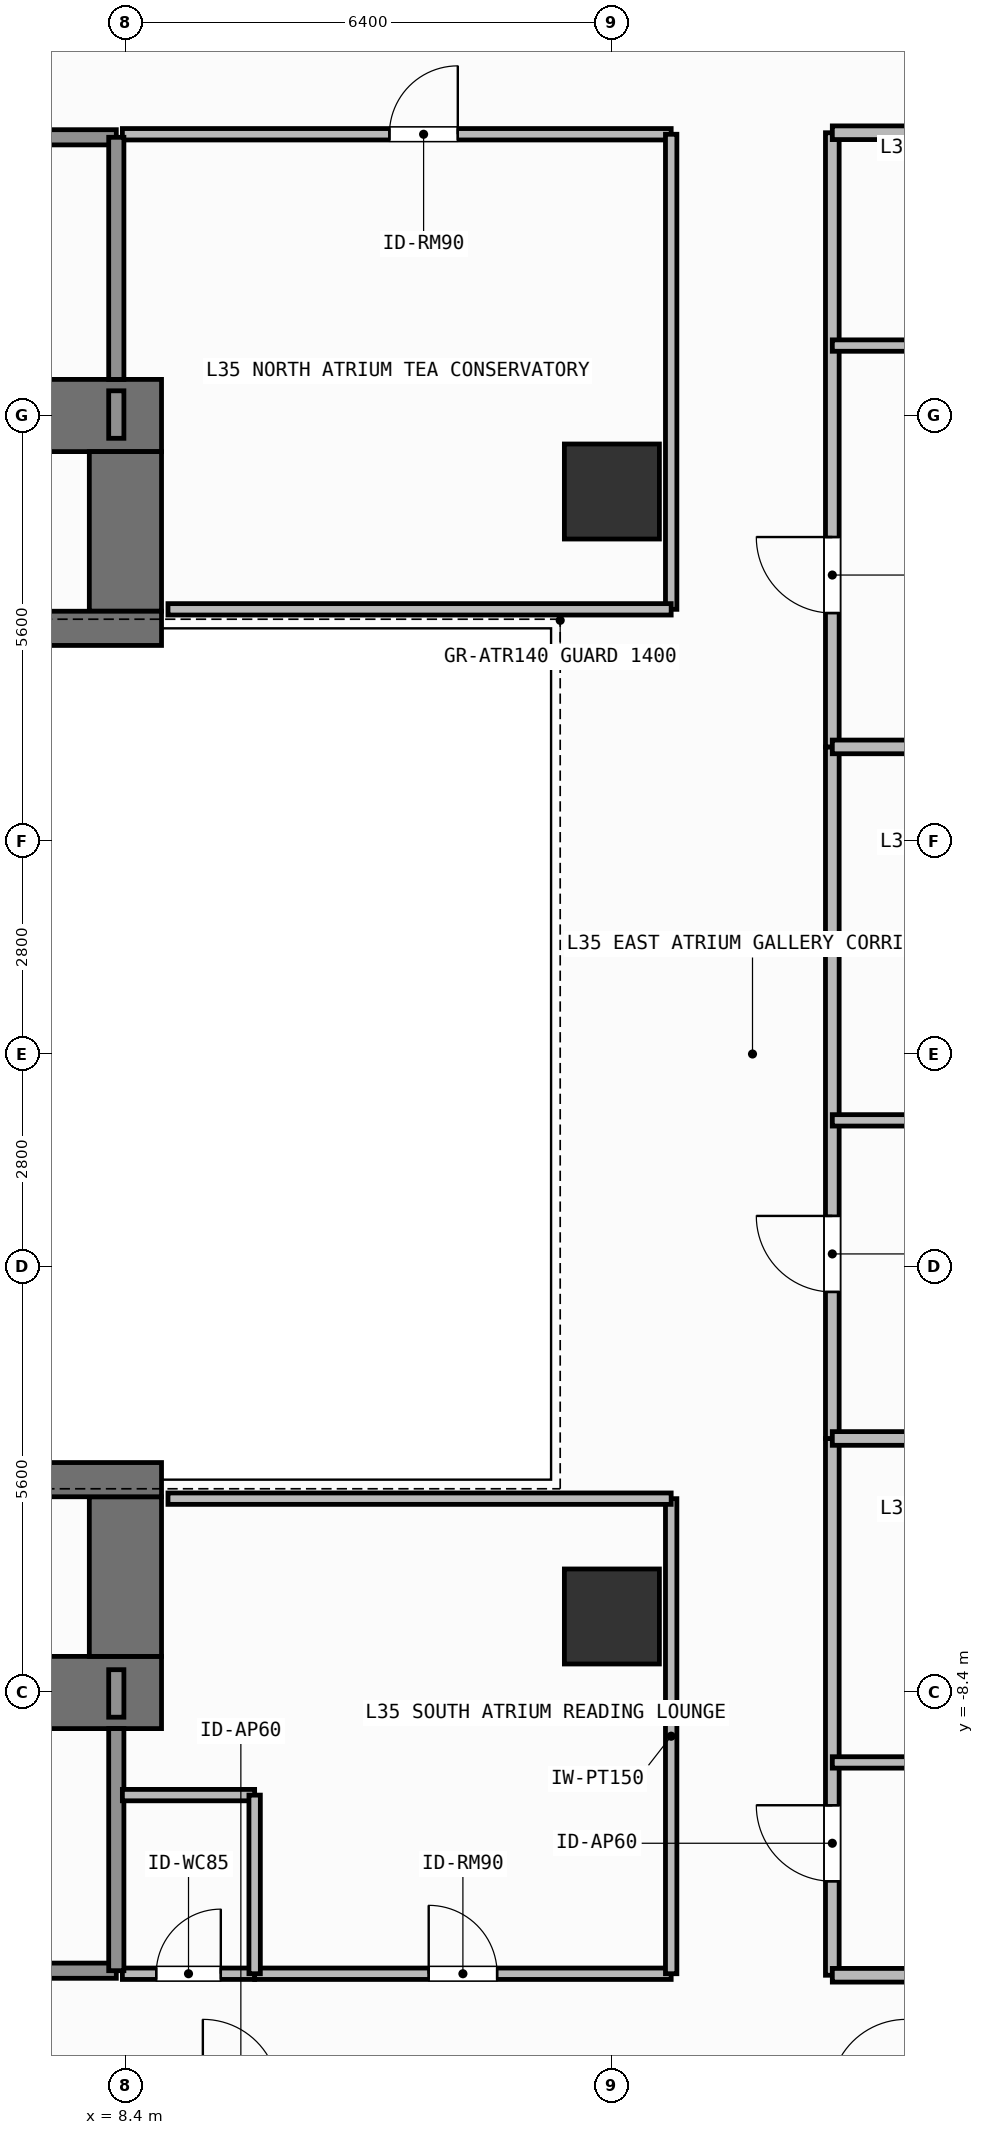
"""IFC4 building model, lengths in metres.
Left out: names, types, materials, properties, quantities, classifications, styles, units other than length and angle.
Written with IfcOpenShell. Run it as: python <this file> out.ifc"""

import sys

from ifc_helpers import new_model, si_unit, direction, frame, frame_2d, origin, origin_2d, place, context, subcontext, project, spatial, rectangle, extrude, element, fill, save


model = new_model("IFC4")
c1 = context("Model", 3, precision=1e-05, world=origin(), true_north=direction((0.0, 1.0)))
c2 = subcontext(c1, "Body", "Model", "MODEL_VIEW")
j1 = project(units=[si_unit("LENGTHUNIT", "METRE"), si_unit("PLANEANGLEUNIT", "RADIAN")], contexts=[c1])
p1 = place(None, origin())
s1 = spatial("IfcSite", under=j1, at=p1, CompositionType="ELEMENT")
p2 = place(p1, origin())
s2 = spatial("IfcBuilding", under=s1, at=p2, CompositionType="ELEMENT")
p3 = place(p2, frame((0.0, 0.0, 140.7)))
s3 = spatial("IfcBuildingStorey", under=s2, at=p3, CompositionType="ELEMENT", Elevation=140.7)
p4 = place(p3, frame((6.12, -8.4, 0.0), z_axis=(0.0, 0.0, 1.0), x_axis=(1.0, 0.0, 0.0)))
e1 = element("IfcWall", 1, at=p4, inside=s3, PredefinedType="SHEAR", context=c2, shape_type="SweptSolid", body=[
    extrude(rectangle(XDim=2.755, YDim=0.95, at=frame_2d((1.377, 0.0))), origin(), (0.0, 0.0, 1.0), 3.9),
])
p5 = place(p3, frame((-7.55, 8.4, 0.0), z_axis=(0.0, 0.0, 1.0), x_axis=(1.0, 0.0, 0.0)))
e2 = element("IfcWall", 2, at=p5, inside=s3, PredefinedType="SHEAR", context=c2, shape_type="SweptSolid", body=[
    extrude(rectangle(XDim=16.425, YDim=0.95, at=frame_2d((8.212, 0.0))), origin(), (0.0, 0.0, 1.0), 3.9),
])
for number, where, z_axis, x_axis in (
    (3, (8.4, -7.925, 0.0), (0.0, 0.0, 1.0), (0.0, 1.0, 0.0)),
    (4, (8.4, 5.825, 0.0), (0.0, 0.0, 1.0), (0.0, 1.0, 0.0)),
):
    element("IfcWall", number, at=place(p3, frame(where, z_axis=z_axis, x_axis=x_axis)), inside=s3, PredefinedType="SHEAR", context=c2, shape_type="SweptSolid", body=[
        extrude(rectangle(XDim=2.1, YDim=0.95, at=frame_2d((1.05, 0.0))), origin(), (0.0, 0.0, 1.0), 3.9),
    ])
for number, where, z_axis, x_axis in (
    (5, (3.045, -5.6, 0.0), (0.0, 0.0, 1.0), (1.0, 0.0, 0.0)),
    (6, (3.045, 5.6, 0.0), (0.0, 0.0, 1.0), (1.0, 0.0, 0.0)),
):
    element("IfcWall", number, at=place(p3, frame(where, z_axis=z_axis, x_axis=x_axis)), inside=s3, PredefinedType="SHEAR", context=c2, shape_type="SweptSolid", body=[
        extrude(rectangle(XDim=5.83, YDim=0.45, at=frame_2d((2.915, 0.0))), origin(), (0.0, 0.0, 1.0), 3.9),
    ])
for number, where, z_axis, x_axis in (
    (7, (14.8, -7.4, 0.0), (0.0, 0.0, 1.0), (1.0, 0.0, 0.0)),
    (8, (14.8, 7.4, 0.0), (0.0, 0.0, 1.0), (1.0, 0.0, 0.0)),
):
    element("IfcColumn", number, at=place(p3, frame(where, z_axis=z_axis, x_axis=x_axis)), inside=s3, PredefinedType="COLUMN", context=c2, shape_type="SweptSolid", body=[
        extrude(rectangle(XDim=1.25, YDim=1.25, at=origin_2d()), origin(), (0.0, 0.0, 1.0), 3.9),
    ])
p6 = place(p3, frame((4.58, -12.06, 0.0), z_axis=(0.0, 0.0, 1.0), x_axis=(1.0, 0.0, 0.0)))
e9 = element("IfcWall", 9, at=p6, inside=s3, PredefinedType="SOLIDWALL", context=c2, shape_type="SweptSolid", body=[
    extrude(rectangle(XDim=3.7, YDim=0.2, at=frame_2d((1.85, 0.0))), origin(), (0.0, 0.0, 1.0), 3.68),
])
p7 = place(p6, frame((1.212, 0.0, 0.0)))
e10 = element("IfcOpeningElement", 10, at=p7, cuts=e9, PredefinedType="OPENING", context=c2, shape_type="SweptSolid", body=[
    extrude(rectangle(XDim=1.1, YDim=2.15, at=frame_2d((0.55, 1.075))), frame((0.0, 0.11, 0.0), z_axis=(0.0, -1.0, 0.0), x_axis=(1.0, 0.0, 0.0)), (0.0, 0.0, 1.0), 0.22),
])
p8 = place(p3, frame((4.58, 12.06, 0.0), z_axis=(0.0, 0.0, 1.0), x_axis=(1.0, 0.0, 0.0)))
e11 = element("IfcWall", 11, at=p8, inside=s3, PredefinedType="SOLIDWALL", context=c2, shape_type="SweptSolid", body=[
    extrude(rectangle(XDim=3.7, YDim=0.2, at=frame_2d((1.85, 0.0))), origin(), (0.0, 0.0, 1.0), 3.68),
])
p9 = place(p8, frame((1.212, 0.0, 0.0)))
e12 = element("IfcOpeningElement", 12, at=p9, cuts=e11, PredefinedType="OPENING", context=c2, shape_type="SweptSolid", body=[
    extrude(rectangle(XDim=1.1, YDim=2.15, at=frame_2d((0.55, 1.075))), frame((0.0, 0.11, 0.0), z_axis=(0.0, -1.0, 0.0), x_axis=(1.0, 0.0, 0.0)), (0.0, 0.0, 1.0), 0.22),
])
p10 = place(p3, frame((8.36, -12.1, 0.0), z_axis=(0.0, 0.0, 1.0), x_axis=(1.0, 0.0, 0.0)))
e13 = element("IfcWall", 13, at=p10, inside=s3, PredefinedType="PARTITIONING", context=c2, shape_type="SweptSolid", body=[
    extrude(rectangle(XDim=1.74, YDim=0.15, at=frame_2d((0.87, 0.0))), origin(), (0.0, 0.0, 1.0), 3.68),
])
p11 = place(p10, frame((0.445, 0.0, 0.0)))
e14 = element("IfcOpeningElement", 14, at=p11, cuts=e13, PredefinedType="OPENING", context=c2, shape_type="SweptSolid", body=[
    extrude(rectangle(XDim=0.85, YDim=2.1, at=frame_2d((0.425, 1.05))), frame((0.0, 0.085, 0.0), z_axis=(0.0, -1.0, 0.0), x_axis=(1.0, 0.0, 0.0)), (0.0, 0.0, 1.0), 0.17),
])
p12 = place(p3, frame((10.1, -12.1, 0.0), z_axis=(0.0, 0.0, 1.0), x_axis=(1.0, 0.0, 0.0)))
e15 = element("IfcWall", 15, at=p12, inside=s3, PredefinedType="PARTITIONING", context=c2, shape_type="SweptSolid", body=[
    extrude(rectangle(XDim=5.48, YDim=0.15, at=frame_2d((2.74, 0.0))), origin(), (0.0, 0.0, 1.0), 3.68),
])
p13 = place(p12, frame((2.29, 0.0, 0.0)))
e16 = element("IfcOpeningElement", 16, at=p13, cuts=e15, PredefinedType="OPENING", context=c2, shape_type="SweptSolid", body=[
    extrude(rectangle(XDim=0.9, YDim=2.1, at=frame_2d((0.45, 1.05))), frame((0.0, 0.085, 0.0), z_axis=(0.0, -1.0, 0.0), x_axis=(1.0, 0.0, 0.0)), (0.0, 0.0, 1.0), 0.17),
])
p14 = place(p3, frame((8.36, 12.1, 0.0), z_axis=(0.0, 0.0, 1.0), x_axis=(1.0, 0.0, 0.0)))
e17 = element("IfcWall", 17, at=p14, inside=s3, PredefinedType="PARTITIONING", context=c2, shape_type="SweptSolid", body=[
    extrude(rectangle(XDim=7.22, YDim=0.15, at=frame_2d((3.61, 0.0))), origin(), (0.0, 0.0, 1.0), 3.68),
])
p15 = place(p14, frame((3.513, 0.0, 0.0)))
e18 = element("IfcOpeningElement", 18, at=p15, cuts=e17, PredefinedType="OPENING", context=c2, shape_type="SweptSolid", body=[
    extrude(rectangle(XDim=0.9, YDim=2.1, at=frame_2d((0.45, 1.05))), frame((0.0, 0.085, 0.0), z_axis=(0.0, -1.0, 0.0), x_axis=(1.0, 0.0, 0.0)), (0.0, 0.0, 1.0), 0.17),
])
p16 = place(p3, frame((17.7, -12.12, 0.0), z_axis=(0.0, 0.0, 1.0), x_axis=(0.0, 1.0, 0.0)))
e19 = element("IfcWall", 19, at=p16, inside=s3, PredefinedType="PARTITIONING", context=c2, shape_type="SweptSolid", body=[
    extrude(rectangle(XDim=7.062, YDim=0.18, at=frame_2d((3.531, 0.0))), origin(), (0.0, 0.0, 1.0), 3.68),
])
p17 = place(p16, frame((1.237, 0.0, 0.0)))
e20 = element("IfcOpeningElement", 20, at=p17, cuts=e19, PredefinedType="OPENING", context=c2, shape_type="SweptSolid", body=[
    extrude(rectangle(XDim=1.0, YDim=2.2, at=frame_2d((0.5, 1.1))), frame((0.0, 0.1, 0.0), z_axis=(0.0, -1.0, 0.0), x_axis=(1.0, 0.0, 0.0)), (0.0, 0.0, 1.0), 0.2),
])
p18 = place(p3, frame((17.7, -9.32, 0.0), z_axis=(0.0, 0.0, 1.0), x_axis=(1.0, 0.0, 0.0)))
e21 = element("IfcWall", 21, at=p18, inside=s3, PredefinedType="PARTITIONING", context=c2, shape_type="SweptSolid", body=[
    extrude(rectangle(XDim=3.552, YDim=0.15, at=frame_2d((1.776, 0.0))), origin(), (0.0, 0.0, 1.0), 3.68),
])
p19 = place(p18, frame((2.372, 0.0, 0.0)))
e22 = element("IfcOpeningElement", 22, at=p19, cuts=e21, PredefinedType="OPENING", context=c2, shape_type="SweptSolid", body=[
    extrude(rectangle(XDim=0.85, YDim=2.1, at=frame_2d((0.425, 1.05))), frame((0.0, 0.085, 0.0), z_axis=(0.0, -1.0, 0.0), x_axis=(1.0, 0.0, 0.0)), (0.0, 0.0, 1.0), 0.17),
])
p20 = place(p3, frame((17.7, -5.058, 0.0), z_axis=(0.0, 0.0, 1.0), x_axis=(0.0, 1.0, 0.0)))
e23 = element("IfcWall", 23, at=p20, inside=s3, PredefinedType="PARTITIONING", context=c2, shape_type="SweptSolid", body=[
    extrude(rectangle(XDim=9.098, YDim=0.18, at=frame_2d((4.549, 0.0))), origin(), (0.0, 0.0, 1.0), 3.68),
])
p21 = place(p20, frame((1.928, 0.0, 0.0)))
e24 = element("IfcOpeningElement", 24, at=p21, cuts=e23, PredefinedType="OPENING", context=c2, shape_type="SweptSolid", body=[
    extrude(rectangle(XDim=1.0, YDim=2.2, at=frame_2d((0.5, 1.1))), frame((0.0, 0.1, 0.0), z_axis=(0.0, -1.0, 0.0), x_axis=(1.0, 0.0, 0.0)), (0.0, 0.0, 1.0), 0.2),
])
p22 = place(p3, frame((17.7, -0.873, 0.0), z_axis=(0.0, 0.0, 1.0), x_axis=(1.0, 0.0, 0.0)))
e25 = element("IfcWall", 25, at=p22, inside=s3, PredefinedType="PARTITIONING", context=c2, shape_type="SweptSolid", body=[
    extrude(rectangle(XDim=3.552, YDim=0.15, at=frame_2d((1.776, 0.0))), origin(), (0.0, 0.0, 1.0), 3.68),
])
p23 = place(p22, frame((1.351, 0.0, 0.0)))
e26 = element("IfcOpeningElement", 26, at=p23, cuts=e25, PredefinedType="OPENING", context=c2, shape_type="SweptSolid", body=[
    extrude(rectangle(XDim=0.85, YDim=2.1, at=frame_2d((0.425, 1.05))), frame((0.0, 0.085, 0.0), z_axis=(0.0, -1.0, 0.0), x_axis=(1.0, 0.0, 0.0)), (0.0, 0.0, 1.0), 0.17),
])
p24 = place(p3, frame((17.7, 4.04, 0.0), z_axis=(0.0, 0.0, 1.0), x_axis=(0.0, 1.0, 0.0)))
e27 = element("IfcWall", 27, at=p24, inside=s3, PredefinedType="PARTITIONING", context=c2, shape_type="SweptSolid", body=[
    extrude(rectangle(XDim=8.08, YDim=0.18, at=frame_2d((4.04, 0.0))), origin(), (0.0, 0.0, 1.0), 3.68),
])
p25 = place(p24, frame((1.761, 0.0, 0.0)))
e28 = element("IfcOpeningElement", 28, at=p25, cuts=e27, PredefinedType="OPENING", context=c2, shape_type="SweptSolid", body=[
    extrude(rectangle(XDim=1.0, YDim=2.2, at=frame_2d((0.5, 1.1))), frame((0.0, 0.1, 0.0), z_axis=(0.0, -1.0, 0.0), x_axis=(1.0, 0.0, 0.0)), (0.0, 0.0, 1.0), 0.2),
])
p26 = place(p3, frame((17.7, 9.32, 0.0), z_axis=(0.0, 0.0, 1.0), x_axis=(1.0, 0.0, 0.0)))
e29 = element("IfcWall", 29, at=p26, inside=s3, PredefinedType="PARTITIONING", context=c2, shape_type="SweptSolid", body=[
    extrude(rectangle(XDim=3.552, YDim=0.15, at=frame_2d((1.776, 0.0))), origin(), (0.0, 0.0, 1.0), 3.68),
])
p27 = place(p26, frame((2.372, 0.0, 0.0)))
e30 = element("IfcOpeningElement", 30, at=p27, cuts=e29, PredefinedType="OPENING", context=c2, shape_type="SweptSolid", body=[
    extrude(rectangle(XDim=0.85, YDim=2.1, at=frame_2d((0.425, 1.05))), frame((0.0, 0.085, 0.0), z_axis=(0.0, -1.0, 0.0), x_axis=(1.0, 0.0, 0.0)), (0.0, 0.0, 1.0), 0.17),
])
for number, where, z_axis, x_axis in (
    (31, (8.28, -12.06, 0.0), (0.0, 0.0, 1.0), (0.0, 1.0, 0.0)),
    (32, (8.28, 8.875, 0.0), (0.0, 0.0, 1.0), (0.0, 1.0, 0.0)),
):
    element("IfcWall", number, at=place(p3, frame(where, z_axis=z_axis, x_axis=x_axis)), inside=s3, PredefinedType="SOLIDWALL", context=c2, shape_type="SweptSolid", body=[
        extrude(rectangle(XDim=3.185, YDim=0.2, at=frame_2d((1.593, 0.0))), origin(), (0.0, 0.0, 1.0), 3.68),
    ])
p28 = place(p3, frame((8.28, -8.725, 0.0), z_axis=(0.0, 0.0, 1.0), x_axis=(0.0, 1.0, 0.0)))
e33 = element("IfcWall", 33, at=p28, inside=s3, PredefinedType="SOLIDWALL", context=c2, shape_type="SweptSolid", body=[
    extrude(rectangle(XDim=0.625, YDim=0.2, at=frame_2d((0.312, 0.0))), origin(), (0.0, 0.0, 1.0), 3.68),
])
p29 = place(p3, frame((8.36, -9.75, 0.0), z_axis=(0.0, 0.0, 1.0), x_axis=(1.0, 0.0, 0.0)))
e34 = element("IfcWall", 34, at=p29, inside=s3, PredefinedType="PARTITIONING", context=c2, shape_type="SweptSolid", body=[
    extrude(rectangle(XDim=1.74, YDim=0.15, at=frame_2d((0.87, 0.0))), origin(), (0.0, 0.0, 1.0), 3.68),
])
p30 = place(p3, frame((10.1, -12.1, 0.0), z_axis=(0.0, 0.0, 1.0), x_axis=(0.0, 1.0, 0.0)))
e35 = element("IfcWall", 35, at=p30, inside=s3, PredefinedType="PARTITIONING", context=c2, shape_type="SweptSolid", body=[
    extrude(rectangle(XDim=2.35, YDim=0.15, at=frame_2d((1.175, 0.0))), origin(), (0.0, 0.0, 1.0), 3.68),
])
p31 = place(p3, frame((15.58, -12.1, 0.0), z_axis=(0.0, 0.0, 1.0), x_axis=(0.0, 1.0, 0.0)))
e36 = element("IfcWall", 36, at=p31, inside=s3, PredefinedType="PARTITIONING", context=c2, shape_type="SweptSolid", body=[
    extrude(rectangle(XDim=6.25, YDim=0.15, at=frame_2d((3.125, 0.0))), origin(), (0.0, 0.0, 1.0), 3.68),
])
p32 = place(p3, frame((8.96, -5.85, 0.0), z_axis=(0.0, 0.0, 1.0), x_axis=(1.0, 0.0, 0.0)))
e37 = element("IfcWall", 37, at=p32, inside=s3, PredefinedType="PARTITIONING", context=c2, shape_type="SweptSolid", body=[
    extrude(rectangle(XDim=6.62, YDim=0.15, at=frame_2d((3.31, 0.0))), origin(), (0.0, 0.0, 1.0), 3.68),
])
p33 = place(p3, frame((8.28, 8.1, 0.0), z_axis=(0.0, 0.0, 1.0), x_axis=(0.0, 1.0, 0.0)))
e38 = element("IfcWall", 38, at=p33, inside=s3, PredefinedType="SOLIDWALL", context=c2, shape_type="SweptSolid", body=[
    extrude(rectangle(XDim=0.625, YDim=0.2, at=frame_2d((0.312, 0.0))), origin(), (0.0, 0.0, 1.0), 3.68),
])
p34 = place(p3, frame((15.58, 5.85, 0.0), z_axis=(0.0, 0.0, 1.0), x_axis=(0.0, 1.0, 0.0)))
e39 = element("IfcWall", 39, at=p34, inside=s3, PredefinedType="PARTITIONING", context=c2, shape_type="SweptSolid", body=[
    extrude(rectangle(XDim=6.25, YDim=0.15, at=frame_2d((3.125, 0.0))), origin(), (0.0, 0.0, 1.0), 3.68),
])
p35 = place(p3, frame((8.96, 5.85, 0.0), z_axis=(0.0, 0.0, 1.0), x_axis=(1.0, 0.0, 0.0)))
e40 = element("IfcWall", 40, at=p35, inside=s3, PredefinedType="PARTITIONING", context=c2, shape_type="SweptSolid", body=[
    extrude(rectangle(XDim=6.62, YDim=0.15, at=frame_2d((3.31, 0.0))), origin(), (0.0, 0.0, 1.0), 3.68),
])
for number, where, z_axis, x_axis in (
    (41, (17.7, -5.058, 0.0), (0.0, 0.0, 1.0), (1.0, 0.0, 0.0)),
    (42, (17.7, 4.04, 0.0), (0.0, 0.0, 1.0), (1.0, 0.0, 0.0)),
    (43, (17.7, -12.12, 0.0), (0.0, 0.0, 1.0), (1.0, 0.0, 0.0)),
    (44, (17.7, 12.12, 0.0), (0.0, 0.0, 1.0), (1.0, 0.0, 0.0)),
):
    element("IfcWall", number, at=place(p3, frame(where, z_axis=z_axis, x_axis=x_axis)), inside=s3, PredefinedType="PARTITIONING", context=c2, shape_type="SweptSolid", body=[
        extrude(rectangle(XDim=9.83, YDim=0.18, at=frame_2d((4.915, 0.0))), origin(), (0.0, 0.0, 1.0), 3.68),
    ])
p36 = place(p11, origin())
e45 = element("IfcDoor", 45, at=p36, inside=s3, OperationType="SINGLE_SWING_RIGHT", PredefinedType="DOOR", context=c2, shape_type="SweptSolid", body=[
    extrude(rectangle(XDim=0.85, YDim=2.1, at=frame_2d((0.425, 1.05))), frame((0.0, 0.025, 0.0), z_axis=(0.0, -1.0, 0.0), x_axis=(1.0, 0.0, 0.0)), (0.0, 0.0, 1.0), 0.05),
])
fill(e14, e45)
p37 = place(p13, origin())
e46 = element("IfcDoor", 46, at=p37, inside=s3, OperationType="SINGLE_SWING_LEFT", PredefinedType="DOOR", context=c2, shape_type="SweptSolid", body=[
    extrude(rectangle(XDim=0.9, YDim=2.1, at=frame_2d((0.45, 1.05))), frame((0.0, 0.025, 0.0), z_axis=(0.0, -1.0, 0.0), x_axis=(1.0, 0.0, 0.0)), (0.0, 0.0, 1.0), 0.05),
])
fill(e16, e46)
p38 = place(p15, origin())
e47 = element("IfcDoor", 47, at=p38, inside=s3, OperationType="SINGLE_SWING_RIGHT", PredefinedType="DOOR", context=c2, shape_type="SweptSolid", body=[
    extrude(rectangle(XDim=0.9, YDim=2.1, at=frame_2d((0.45, 1.05))), frame((0.0, 0.025, 0.0), z_axis=(0.0, -1.0, 0.0), x_axis=(1.0, 0.0, 0.0)), (0.0, 0.0, 1.0), 0.05),
])
fill(e18, e47)
p39 = place(p17, origin())
e48 = element("IfcDoor", 48, at=p39, inside=s3, OperationType="SINGLE_SWING_RIGHT", PredefinedType="DOOR", context=c2, shape_type="SweptSolid", body=[
    extrude(rectangle(XDim=1.0, YDim=2.2, at=frame_2d((0.5, 1.1))), frame((0.0, 0.025, 0.0), z_axis=(0.0, -1.0, 0.0), x_axis=(1.0, 0.0, 0.0)), (0.0, 0.0, 1.0), 0.05),
])
fill(e20, e48)
p40 = place(p21, origin())
e49 = element("IfcDoor", 49, at=p40, inside=s3, OperationType="SINGLE_SWING_RIGHT", PredefinedType="DOOR", context=c2, shape_type="SweptSolid", body=[
    extrude(rectangle(XDim=1.0, YDim=2.2, at=frame_2d((0.5, 1.1))), frame((0.0, 0.025, 0.0), z_axis=(0.0, -1.0, 0.0), x_axis=(1.0, 0.0, 0.0)), (0.0, 0.0, 1.0), 0.05),
])
fill(e24, e49)
p41 = place(p25, origin())
e50 = element("IfcDoor", 50, at=p41, inside=s3, OperationType="SINGLE_SWING_RIGHT", PredefinedType="DOOR", context=c2, shape_type="SweptSolid", body=[
    extrude(rectangle(XDim=1.0, YDim=2.2, at=frame_2d((0.5, 1.1))), frame((0.0, 0.025, 0.0), z_axis=(0.0, -1.0, 0.0), x_axis=(1.0, 0.0, 0.0)), (0.0, 0.0, 1.0), 0.05),
])
fill(e28, e50)
save(model, sys.argv[1])
